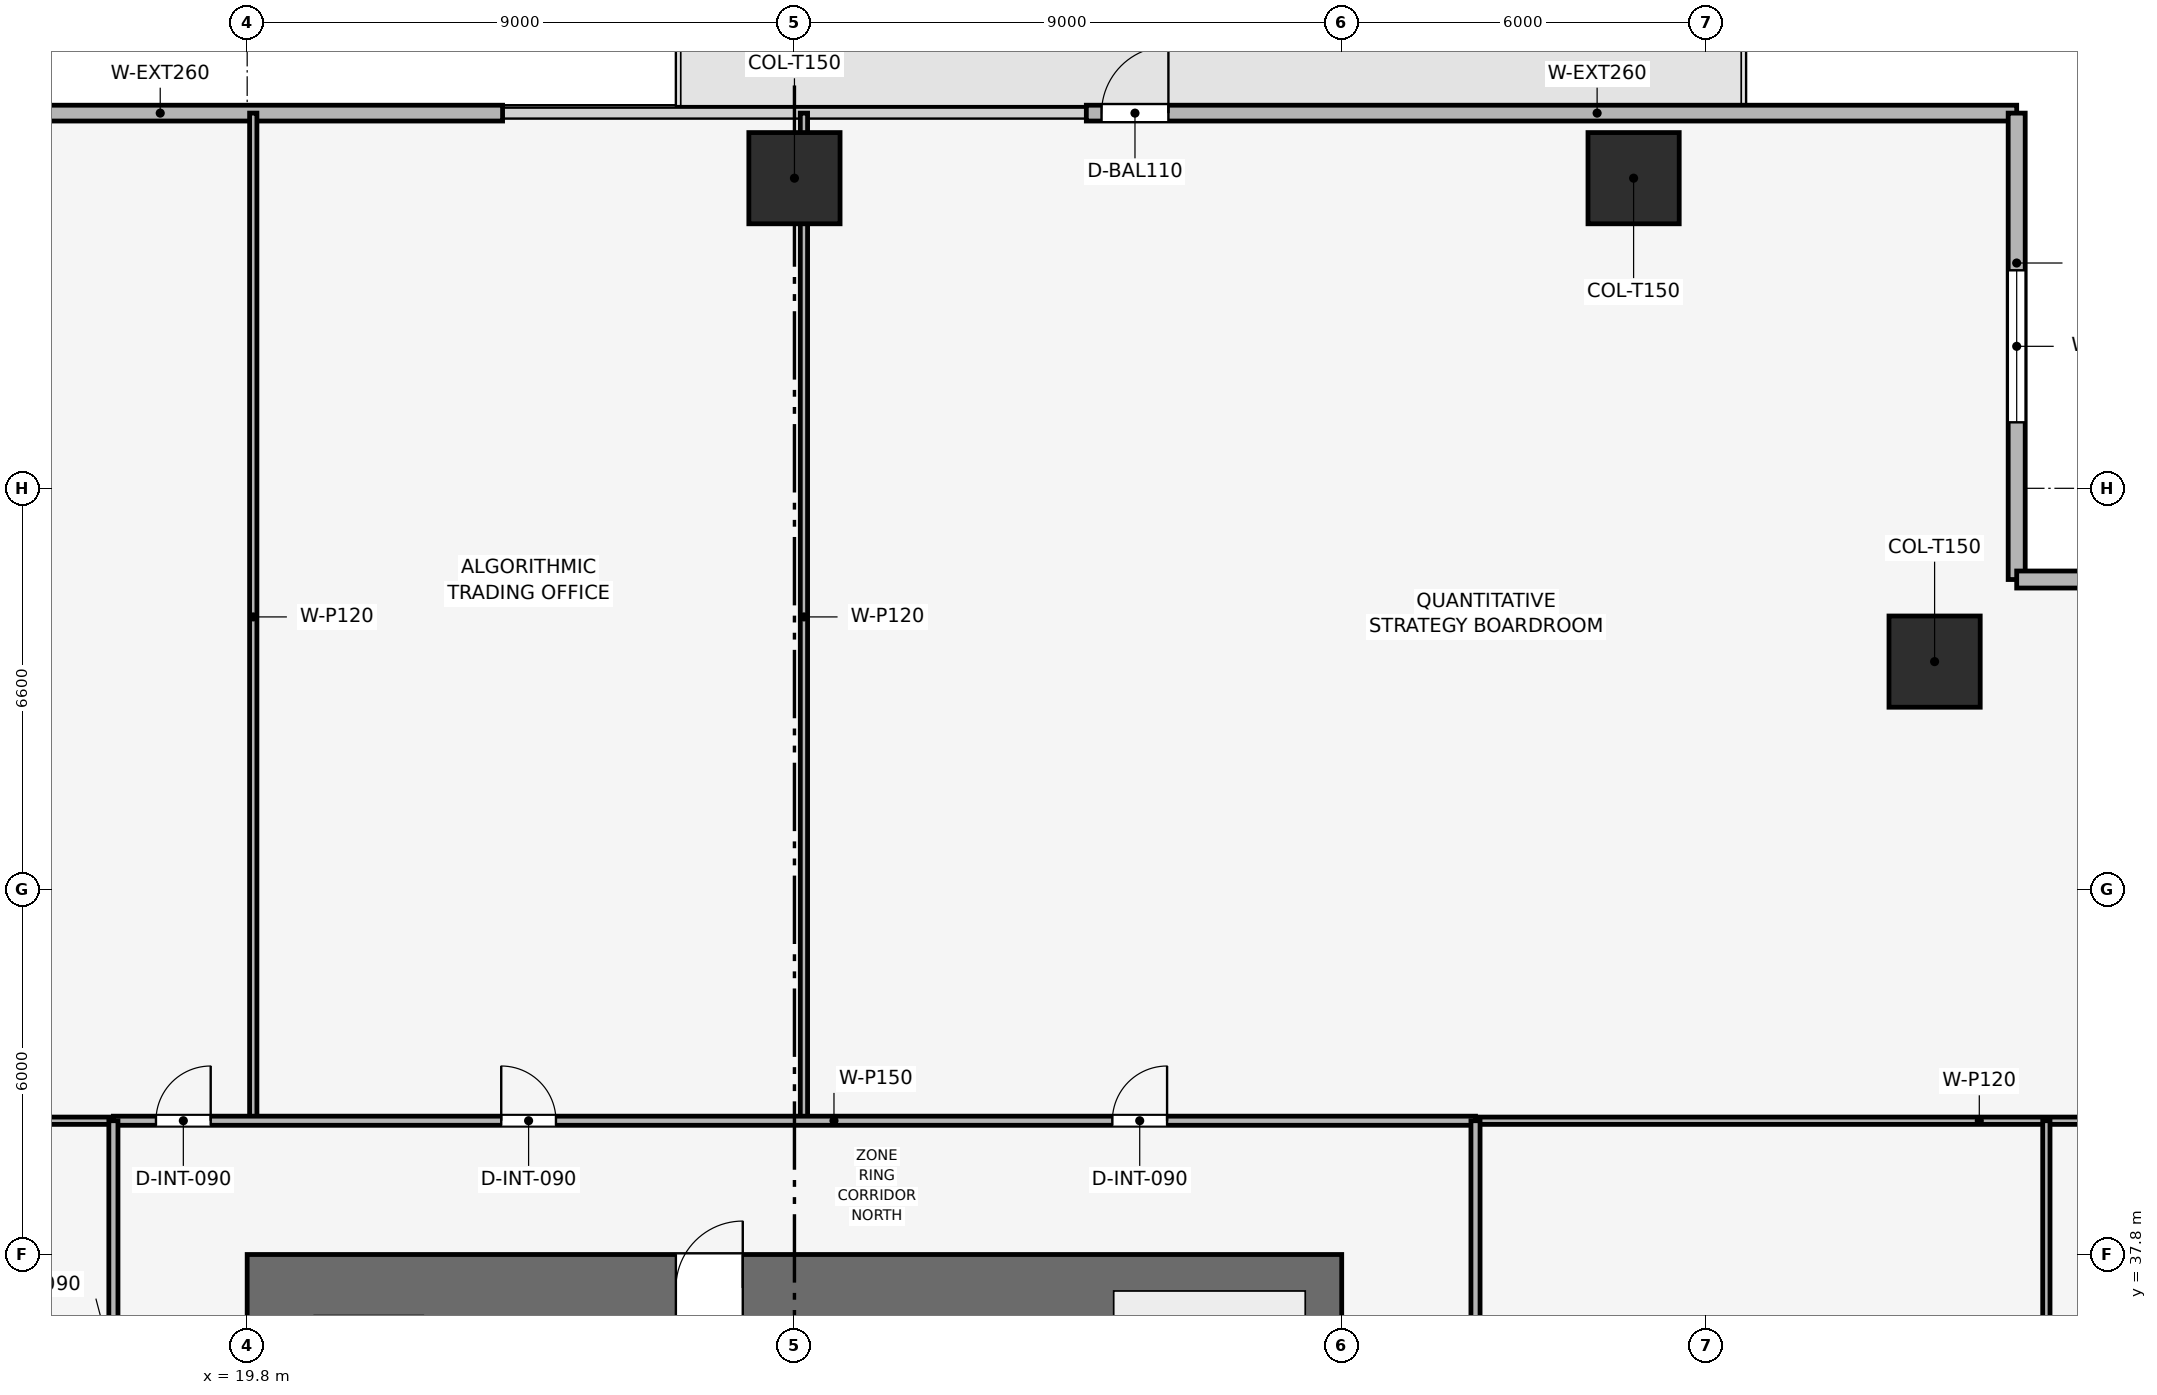
"""IFC4 building model, lengths in metres.
Left out: names, types, materials, properties, quantities, classifications, styles, units other than length and angle.
Written with IfcOpenShell. Run it as: python <this file> out.ifc"""

import sys

from ifc_helpers import new_model, si_unit, direction, frame, frame_2d, origin, origin_2d, place, context, subcontext, project, spatial, rectangle, extrude, element, fill, save


model = new_model("IFC4")
c1 = context("Model", 3, precision=1e-05, world=origin(), true_north=direction((0.0, 1.0)))
c2 = subcontext(c1, "Body", "Model", "MODEL_VIEW")
j1 = project(units=[si_unit("LENGTHUNIT", "METRE"), si_unit("PLANEANGLEUNIT", "RADIAN")], contexts=[c1])
p1 = place(None, origin())
s1 = spatial("IfcSite", under=j1, at=p1, CompositionType="ELEMENT")
p2 = place(p1, origin())
s2 = spatial("IfcBuilding", under=s1, at=p2, CompositionType="ELEMENT")
p3 = place(p2, frame((0.0, 0.0, 53.4)))
s3 = spatial("IfcBuildingStorey", under=s2, at=p3, CompositionType="ELEMENT", Elevation=53.4)
p4 = place(p3, frame((19.8, 37.25, 0.0), z_axis=(0.0, 0.0, 1.0), x_axis=(1.0, 0.0, 0.0)))
e1 = element("IfcWall", 1, at=p4, inside=s3, PredefinedType="SHEAR", context=c2, shape_type="SweptSolid", body=[
    extrude(rectangle(XDim=18.0, YDim=1.1, at=frame_2d((9.0, 0.0))), origin(), (0.0, 0.0, 1.0), 3.9),
])
p5 = place(p4, frame((7.05, 0.0, 0.0)))
e2 = element("IfcOpeningElement", 2, at=p5, cuts=e1, PredefinedType="OPENING", context=c2, shape_type="SweptSolid", body=[
    extrude(rectangle(XDim=1.1, YDim=2.15, at=frame_2d((0.55, 1.075))), frame((0.0, 0.56, 0.0), z_axis=(0.0, -1.0, 0.0), x_axis=(1.0, 0.0, 0.0)), (0.0, 0.0, 1.0), 1.12),
])
for number, where, z_axis, x_axis in (
    (3, (42.6, 55.5, 0.003), (0.0, 0.0, 1.0), (1.0, 0.0, 0.0)),
    (4, (28.8, 55.5, 0.003), (0.0, 0.0, 1.0), (1.0, 0.0, 0.0)),
    (5, (47.55, 47.55, 0.003), (0.0, 0.0, 1.0), (1.0, 0.0, 0.0)),
):
    element("IfcColumn", number, at=place(p3, frame(where, z_axis=z_axis, x_axis=x_axis)), inside=s3, PredefinedType="COLUMN", context=c2, shape_type="SweptSolid", body=[
        extrude(rectangle(XDim=1.5, YDim=1.5, at=origin_2d()), origin(), (0.0, 0.0, 1.0), 3.644),
    ])
p6 = place(p3, frame((8.7, 56.57, 0.0), z_axis=(0.0, 0.0, 1.0), x_axis=(1.0, 0.0, 0.0)))
e6 = element("IfcWall", 6, at=p6, inside=s3, PredefinedType="SOLIDWALL", context=c2, shape_type="SweptSolid", body=[
    extrude(rectangle(XDim=15.3, YDim=0.26, at=frame_2d((7.65, 0.0))), origin(), (0.0, 0.0, 1.0), 3.65),
])
p7 = place(p6, frame((0.25, 0.0, 0.9)))
e7 = element("IfcOpeningElement", 7, at=p7, cuts=e6, PredefinedType="OPENING", context=c2, shape_type="SweptSolid", body=[
    extrude(rectangle(XDim=3.8, YDim=1.9, at=frame_2d((1.9, 0.95))), frame((0.0, 0.14, 0.0), z_axis=(0.0, -1.0, 0.0), x_axis=(1.0, 0.0, 0.0)), (0.0, 0.0, 1.0), 0.28),
])
p8 = place(p3, frame((33.6, 56.57, 0.0), z_axis=(0.0, 0.0, 1.0), x_axis=(1.0, 0.0, 0.0)))
e8 = element("IfcWall", 8, at=p8, inside=s3, PredefinedType="SOLIDWALL", context=c2, shape_type="SweptSolid", body=[
    extrude(rectangle(XDim=15.3, YDim=0.26, at=frame_2d((7.65, 0.0))), origin(), (0.0, 0.0, 1.0), 3.65),
])
p9 = place(p8, frame((0.25, 0.0, 0.0)))
e9 = element("IfcOpeningElement", 9, at=p9, cuts=e8, PredefinedType="OPENING", context=c2, shape_type="SweptSolid", body=[
    extrude(rectangle(XDim=1.1, YDim=2.2, at=frame_2d((0.55, 1.1))), frame((0.0, 0.14, 0.0), z_axis=(0.0, -1.0, 0.0), x_axis=(1.0, 0.0, 0.0)), (0.0, 0.0, 1.0), 0.28),
])
p10 = place(p3, frame((48.9, 56.57, 0.0), z_axis=(0.0, 0.0, 1.0), x_axis=(0.0, -1.0, 0.0)))
e10 = element("IfcWall", 10, at=p10, inside=s3, PredefinedType="SOLIDWALL", context=c2, shape_type="SweptSolid", body=[
    extrude(rectangle(XDim=7.67, YDim=0.28, at=frame_2d((3.835, 0.0))), origin(), (0.0, 0.0, 1.0), 3.65),
])
p11 = place(p10, frame((2.585, 0.0, 0.9)))
e11 = element("IfcOpeningElement", 11, at=p11, cuts=e10, PredefinedType="OPENING", context=c2, shape_type="SweptSolid", body=[
    extrude(rectangle(XDim=2.5, YDim=1.9, at=frame_2d((1.25, 0.95))), frame((0.0, 0.15, 0.0), z_axis=(0.0, -1.0, 0.0), x_axis=(1.0, 0.0, 0.0)), (0.0, 0.0, 1.0), 0.3),
])
p12 = place(p3, frame((48.9, 48.9, 0.0), z_axis=(0.0, 0.0, 1.0), x_axis=(1.0, 0.0, 0.0)))
e12 = element("IfcWall", 12, at=p12, inside=s3, PredefinedType="SOLIDWALL", context=c2, shape_type="SweptSolid", body=[
    extrude(rectangle(XDim=7.67, YDim=0.28, at=frame_2d((3.835, 0.0))), origin(), (0.0, 0.0, 1.0), 3.65),
])
p13 = place(p12, frame((2.585, 0.0, 0.9)))
e13 = element("IfcOpeningElement", 13, at=p13, cuts=e12, PredefinedType="OPENING", context=c2, shape_type="SweptSolid", body=[
    extrude(rectangle(XDim=2.5, YDim=1.9, at=frame_2d((1.25, 0.95))), frame((0.0, 0.15, 0.0), z_axis=(0.0, -1.0, 0.0), x_axis=(1.0, 0.0, 0.0)), (0.0, 0.0, 1.0), 0.3),
])
for number, where, z_axis, x_axis in (
    (14, (19.9, 40.0, 0.0), (0.0, 0.0, 1.0), (0.0, 1.0, 0.0)),
    (15, (28.956, 40.0, 0.0), (0.0, 0.0, 1.0), (0.0, 1.0, 0.0)),
    (16, (1.03, 40.0, 0.0), (0.0, 0.0, 1.0), (1.0, 0.0, 0.0)),
    (17, (40.0, 40.0, 0.0), (0.0, 0.0, 1.0), (1.0, 0.0, 0.0)),
):
    element("IfcWall", number, at=place(p3, frame(where, z_axis=z_axis, x_axis=x_axis)), inside=s3, PredefinedType="PARTITIONING", context=c2, shape_type="SweptSolid", body=[
        extrude(rectangle(XDim=16.57, YDim=0.12, at=frame_2d((8.285, 0.0))), origin(), (0.0, 0.0, 1.0), 2.935),
    ])
p14 = place(p3, frame((49.388, 17.6, 0.0), z_axis=(0.0, 0.0, 1.0), x_axis=(0.0, 1.0, 0.0)))
e18 = element("IfcWall", 18, at=p14, inside=s3, PredefinedType="PARTITIONING", context=c2, shape_type="SweptSolid", body=[
    extrude(rectangle(XDim=22.4, YDim=0.12, at=frame_2d((11.2, 0.0))), origin(), (0.0, 0.0, 1.0), 3.085),
])
p15 = place(p14, frame((17.783, 0.0, 0.0)))
e19 = element("IfcOpeningElement", 19, at=p15, cuts=e18, PredefinedType="OPENING", context=c2, shape_type="SweptSolid", body=[
    extrude(rectangle(XDim=0.9, YDim=2.1, at=frame_2d((0.45, 1.05))), frame((0.0, 0.07, 0.0), z_axis=(0.0, -1.0, 0.0), x_axis=(1.0, 0.0, 0.0)), (0.0, 0.0, 1.0), 0.14),
])
p16 = place(p3, frame((17.6, 40.0, 0.0), z_axis=(0.0, 0.0, 1.0), x_axis=(1.0, 0.0, 0.0)))
e20 = element("IfcWall", 20, at=p16, inside=s3, PredefinedType="PARTITIONING", context=c2, shape_type="SweptSolid", body=[
    extrude(rectangle(XDim=22.4, YDim=0.15, at=frame_2d((11.2, 0.0))), origin(), (0.0, 0.0, 1.0), 3.085),
])
p17 = place(p16, frame((0.7, 0.0, 0.0)))
e21 = element("IfcOpeningElement", 21, at=p17, cuts=e20, PredefinedType="OPENING", context=c2, shape_type="SweptSolid", body=[
    extrude(rectangle(XDim=0.9, YDim=2.1, at=frame_2d((0.45, 1.05))), frame((0.0, 0.085, 0.0), z_axis=(0.0, -1.0, 0.0), x_axis=(1.0, 0.0, 0.0)), (0.0, 0.0, 1.0), 0.17),
])
p18 = place(p16, frame((6.378, 0.0, 0.0)))
e22 = element("IfcOpeningElement", 22, at=p18, cuts=e20, PredefinedType="OPENING", context=c2, shape_type="SweptSolid", body=[
    extrude(rectangle(XDim=0.9, YDim=2.1, at=frame_2d((0.45, 1.05))), frame((0.0, 0.085, 0.0), z_axis=(0.0, -1.0, 0.0), x_axis=(1.0, 0.0, 0.0)), (0.0, 0.0, 1.0), 0.17),
])
p19 = place(p16, frame((16.428, 0.0, 0.0)))
e23 = element("IfcOpeningElement", 23, at=p19, cuts=e20, PredefinedType="OPENING", context=c2, shape_type="SweptSolid", body=[
    extrude(rectangle(XDim=0.9, YDim=2.1, at=frame_2d((0.45, 1.05))), frame((0.0, 0.085, 0.0), z_axis=(0.0, -1.0, 0.0), x_axis=(1.0, 0.0, 0.0)), (0.0, 0.0, 1.0), 0.17),
])
p20 = place(p3, frame((17.6, 17.6, 0.0), z_axis=(0.0, 0.0, 1.0), x_axis=(0.0, 1.0, 0.0)))
e24 = element("IfcWall", 24, at=p20, inside=s3, PredefinedType="PARTITIONING", context=c2, shape_type="SweptSolid", body=[
    extrude(rectangle(XDim=22.4, YDim=0.15, at=frame_2d((11.2, 0.0))), origin(), (0.0, 0.0, 1.0), 3.085),
])
p21 = place(p20, frame((0.707, 0.0, 0.0)))
e25 = element("IfcOpeningElement", 25, at=p21, cuts=e24, PredefinedType="OPENING", context=c2, shape_type="SweptSolid", body=[
    extrude(rectangle(XDim=0.9, YDim=2.1, at=frame_2d((0.45, 1.05))), frame((0.0, 0.085, 0.0), z_axis=(0.0, -1.0, 0.0), x_axis=(1.0, 0.0, 0.0)), (0.0, 0.0, 1.0), 0.17),
])
p22 = place(p20, frame((4.745, 0.0, 0.0)))
e26 = element("IfcOpeningElement", 26, at=p22, cuts=e24, PredefinedType="OPENING", context=c2, shape_type="SweptSolid", body=[
    extrude(rectangle(XDim=0.9, YDim=2.1, at=frame_2d((0.45, 1.05))), frame((0.0, 0.085, 0.0), z_axis=(0.0, -1.0, 0.0), x_axis=(1.0, 0.0, 0.0)), (0.0, 0.0, 1.0), 0.17),
])
p23 = place(p20, frame((10.769, 0.0, 0.0)))
e27 = element("IfcOpeningElement", 27, at=p23, cuts=e24, PredefinedType="OPENING", context=c2, shape_type="SweptSolid", body=[
    extrude(rectangle(XDim=0.9, YDim=2.1, at=frame_2d((0.45, 1.05))), frame((0.0, 0.085, 0.0), z_axis=(0.0, -1.0, 0.0), x_axis=(1.0, 0.0, 0.0)), (0.0, 0.0, 1.0), 0.17),
])
p24 = place(p20, frame((17.931, 0.0, 0.0)))
e28 = element("IfcOpeningElement", 28, at=p24, cuts=e24, PredefinedType="OPENING", context=c2, shape_type="SweptSolid", body=[
    extrude(rectangle(XDim=0.9, YDim=2.1, at=frame_2d((0.45, 1.05))), frame((0.0, 0.085, 0.0), z_axis=(0.0, -1.0, 0.0), x_axis=(1.0, 0.0, 0.0)), (0.0, 0.0, 1.0), 0.17),
])
p25 = place(p3, frame((40.0, 17.6, 0.0), z_axis=(0.0, 0.0, 1.0), x_axis=(0.0, 1.0, 0.0)))
e29 = element("IfcWall", 29, at=p25, inside=s3, PredefinedType="PARTITIONING", context=c2, shape_type="SweptSolid", body=[
    extrude(rectangle(XDim=22.4, YDim=0.15, at=frame_2d((11.2, 0.0))), origin(), (0.0, 0.0, 1.0), 3.085),
])
p26 = place(p25, frame((10.75, 0.0, 0.0)))
e30 = element("IfcOpeningElement", 30, at=p26, cuts=e29, PredefinedType="OPENING", context=c2, shape_type="SweptSolid", body=[
    extrude(rectangle(XDim=0.9, YDim=2.1, at=frame_2d((0.45, 1.05))), frame((0.0, 0.085, 0.0), z_axis=(0.0, -1.0, 0.0), x_axis=(1.0, 0.0, 0.0)), (0.0, 0.0, 1.0), 0.17),
])
p27 = place(p9, origin())
e31 = element("IfcDoor", 31, at=p27, inside=s3, OperationType="SINGLE_SWING_RIGHT", PredefinedType="DOOR", context=c2, shape_type="SweptSolid", body=[
    extrude(rectangle(XDim=1.1, YDim=2.2, at=frame_2d((0.55, 1.1))), frame((0.0, 0.025, 0.0), z_axis=(0.0, -1.0, 0.0), x_axis=(1.0, 0.0, 0.0)), (0.0, 0.0, 1.0), 0.05),
])
fill(e9, e31)
p28 = place(p11, origin())
e32 = element("IfcWindow", 32, at=p28, inside=s3, PartitioningType="SINGLE_PANEL", PredefinedType="WINDOW", context=c2, shape_type="SweptSolid", body=[
    extrude(rectangle(XDim=2.5, YDim=1.9, at=frame_2d((1.25, 0.95))), frame((0.0, 0.03, 0.0), z_axis=(0.0, -1.0, 0.0), x_axis=(1.0, 0.0, 0.0)), (0.0, 0.0, 1.0), 0.06),
])
fill(e11, e32)
p29 = place(p17, origin())
e33 = element("IfcDoor", 33, at=p29, inside=s3, OperationType="SINGLE_SWING_RIGHT", PredefinedType="DOOR", context=c2, shape_type="SweptSolid", body=[
    extrude(rectangle(XDim=0.9, YDim=2.1, at=frame_2d((0.45, 1.05))), frame((0.0, 0.025, 0.0), z_axis=(0.0, -1.0, 0.0), x_axis=(1.0, 0.0, 0.0)), (0.0, 0.0, 1.0), 0.05),
])
fill(e21, e33)
p30 = place(p18, origin())
e34 = element("IfcDoor", 34, at=p30, inside=s3, OperationType="SINGLE_SWING_LEFT", PredefinedType="DOOR", context=c2, shape_type="SweptSolid", body=[
    extrude(rectangle(XDim=0.9, YDim=2.1, at=frame_2d((0.45, 1.05))), frame((0.0, 0.025, 0.0), z_axis=(0.0, -1.0, 0.0), x_axis=(1.0, 0.0, 0.0)), (0.0, 0.0, 1.0), 0.05),
])
fill(e22, e34)
p31 = place(p19, origin())
e35 = element("IfcDoor", 35, at=p31, inside=s3, OperationType="SINGLE_SWING_RIGHT", PredefinedType="DOOR", context=c2, shape_type="SweptSolid", body=[
    extrude(rectangle(XDim=0.9, YDim=2.1, at=frame_2d((0.45, 1.05))), frame((0.0, 0.025, 0.0), z_axis=(0.0, -1.0, 0.0), x_axis=(1.0, 0.0, 0.0)), (0.0, 0.0, 1.0), 0.05),
])
fill(e23, e35)
p32 = place(p5, origin())
e36 = element("IfcDoor", 36, at=p32, inside=s3, OperationType="SINGLE_SWING_RIGHT", PredefinedType="DOOR", context=c2, shape_type="SweptSolid", body=[
    extrude(rectangle(XDim=1.1, YDim=2.15, at=frame_2d((0.55, 1.075))), frame((0.0, 0.025, 0.0), z_axis=(0.0, -1.0, 0.0), x_axis=(1.0, 0.0, 0.0)), (0.0, 0.0, 1.0), 0.05),
])
fill(e2, e36)
save(model, sys.argv[1])
